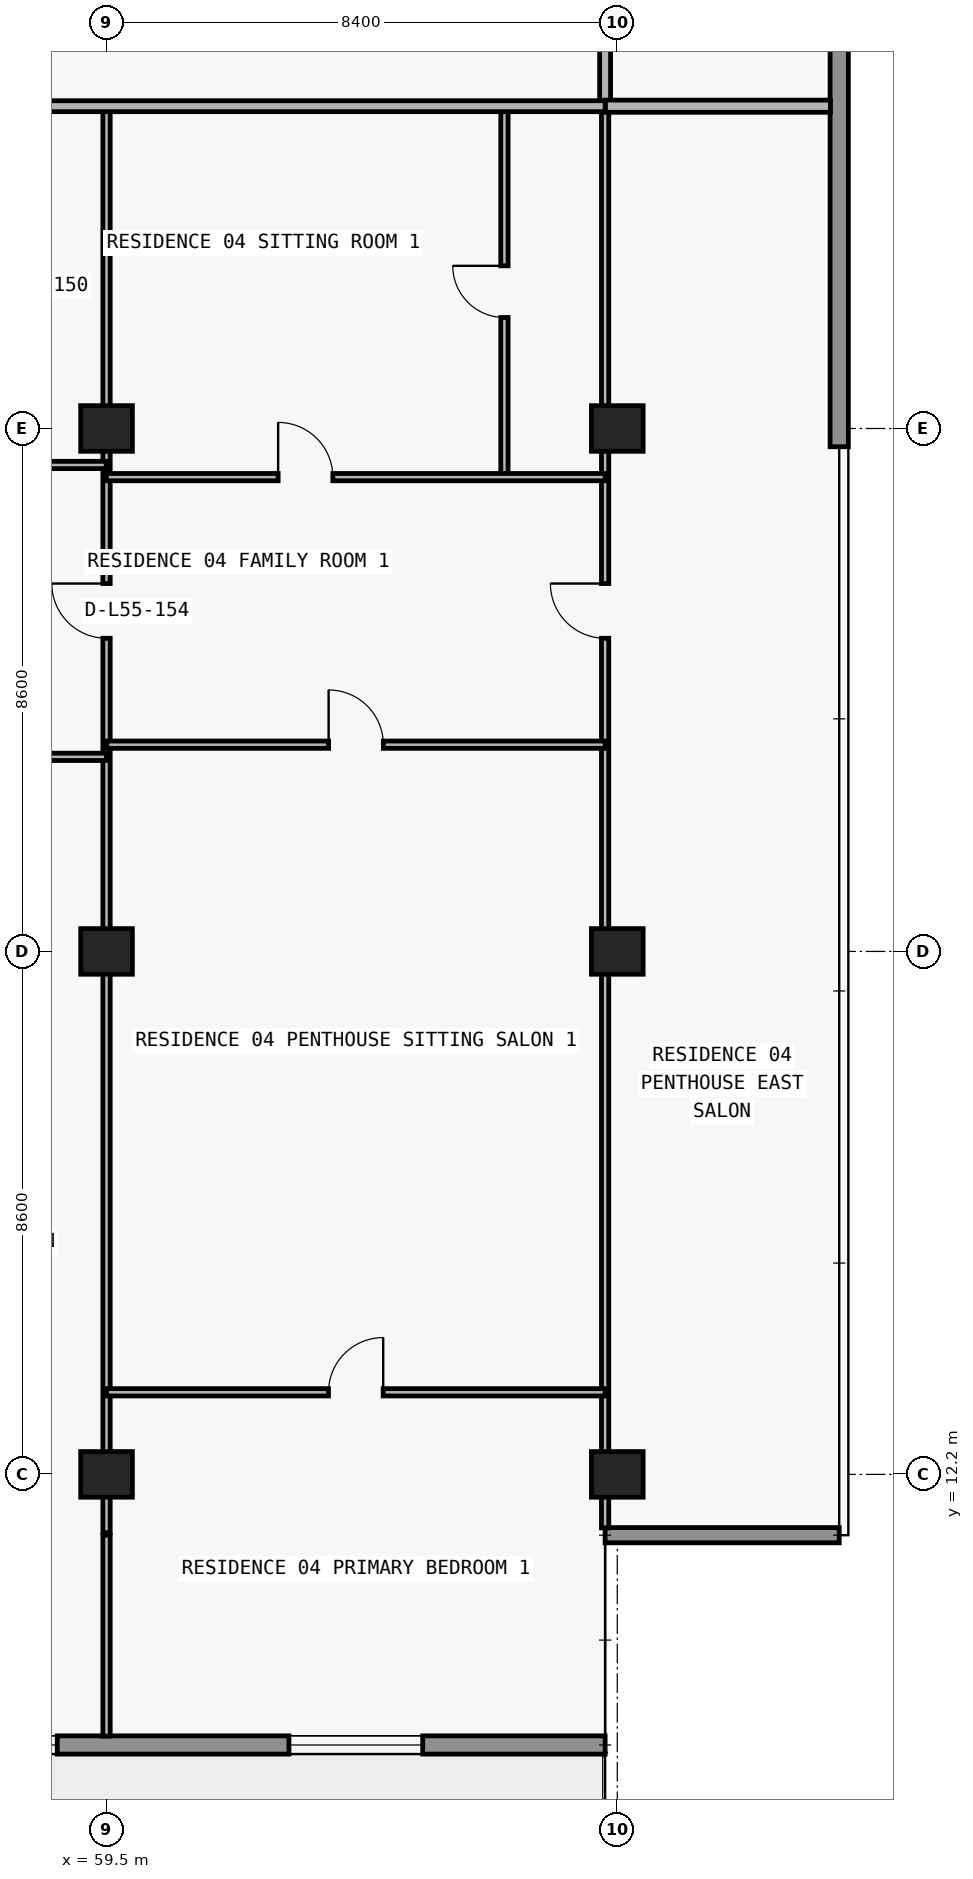
"""IFC4 building model, lengths in metres.
Left out: names, types, materials, properties, quantities, classifications, styles, units other than length and angle.
Written with IfcOpenShell. Run it as: python <this file> out.ifc"""

import sys

from ifc_helpers import new_model, si_unit, direction, frame, frame_2d, origin, origin_2d, place, context, subcontext, project, spatial, rectangle, extrude, element, fill, save


model = new_model("IFC4")
c1 = context("Model", 3, precision=1e-05, world=origin(), true_north=direction((0.0, 1.0)))
c2 = subcontext(c1, "Body", "Model", "MODEL_VIEW")
j1 = project(units=[si_unit("LENGTHUNIT", "METRE"), si_unit("PLANEANGLEUNIT", "RADIAN")], contexts=[c1])
p1 = place(None, origin())
s1 = spatial("IfcSite", under=j1, at=p1, CompositionType="ELEMENT")
p2 = place(p1, origin())
s2 = spatial("IfcBuilding", under=s1, at=p2, CompositionType="ELEMENT")
p3 = place(p2, frame((0.0, 0.0, 198.3)))
s3 = spatial("IfcBuildingStorey", under=s2, at=p3, CompositionType="ELEMENT", Elevation=198.3)
for number, where, z_axis, x_axis in (
    (1, (59.5, 12.2, 0.0), (0.0, 0.0, 1.0), (1.0, 0.0, 0.0)),
    (2, (67.9, 12.2, 0.0), (0.0, 0.0, 1.0), (1.0, 0.0, 0.0)),
    (3, (59.5, 20.8, 0.0), (0.0, 0.0, 1.0), (1.0, 0.0, 0.0)),
    (4, (67.9, 20.8, 0.0), (0.0, 0.0, 1.0), (1.0, 0.0, 0.0)),
    (5, (59.5, 29.4, 0.0), (0.0, 0.0, 1.0), (1.0, 0.0, 0.0)),
    (6, (67.9, 29.4, 0.0), (0.0, 0.0, 1.0), (1.0, 0.0, 0.0)),
):
    element("IfcColumn", number, at=place(p3, frame(where, z_axis=z_axis, x_axis=x_axis)), inside=s3, PredefinedType="COLUMN", context=c2, shape_type="SweptSolid", body=[
        extrude(rectangle(XDim=0.85, YDim=0.75, at=origin_2d()), origin(), (0.0, 0.0, 1.0), 3.05),
    ])
p4 = place(p3, frame((67.7, 7.75, 0.0), z_axis=(0.0, 0.0, 1.0), x_axis=(-1.0, 0.0, 0.0)))
e7 = element("IfcWall", 7, at=p4, inside=s3, PredefinedType="STANDARD", context=c2, shape_type="SweptSolid", body=[
    extrude(rectangle(XDim=57.6, YDim=0.3, at=frame_2d((28.8, 0.0))), origin(), (0.0, 0.0, 1.0), 3.05),
])
p5 = place(p4, frame((54.673, 0.0, 0.0)))
e8 = element("IfcOpeningElement", 8, at=p5, cuts=e7, PredefinedType="OPENING", context=c2, shape_type="SweptSolid", body=[
    extrude(rectangle(XDim=2.0, YDim=2.3, at=frame_2d((1.0, 1.15))), frame((0.0, 0.16, 0.0), z_axis=(0.0, -1.0, 0.0), x_axis=(1.0, 0.0, 0.0)), (0.0, 0.0, 1.0), 0.32),
])
p6 = place(p4, frame((50.473, 0.0, 0.85)))
e9 = element("IfcOpeningElement", 9, at=p6, cuts=e7, PredefinedType="OPENING", context=c2, shape_type="SweptSolid", body=[
    extrude(rectangle(XDim=2.2, YDim=1.55, at=frame_2d((1.1, 0.775))), frame((0.0, 0.16, 0.0), z_axis=(0.0, -1.0, 0.0), x_axis=(1.0, 0.0, 0.0)), (0.0, 0.0, 1.0), 0.32),
])
p7 = place(p4, frame((46.09, 0.0, 0.0)))
e10 = element("IfcOpeningElement", 10, at=p7, cuts=e7, PredefinedType="OPENING", context=c2, shape_type="SweptSolid", body=[
    extrude(rectangle(XDim=2.0, YDim=2.3, at=frame_2d((1.0, 1.15))), frame((0.0, 0.16, 0.0), z_axis=(0.0, -1.0, 0.0), x_axis=(1.0, 0.0, 0.0)), (0.0, 0.0, 1.0), 0.32),
])
p8 = place(p4, frame((41.99, 0.0, 0.85)))
e11 = element("IfcOpeningElement", 11, at=p8, cuts=e7, PredefinedType="OPENING", context=c2, shape_type="SweptSolid", body=[
    extrude(rectangle(XDim=1.8, YDim=1.55, at=frame_2d((0.9, 0.775))), frame((0.0, 0.16, 0.0), z_axis=(0.0, -1.0, 0.0), x_axis=(1.0, 0.0, 0.0)), (0.0, 0.0, 1.0), 0.32),
])
p9 = place(p4, frame((38.09, 0.0, 0.0)))
e12 = element("IfcOpeningElement", 12, at=p9, cuts=e7, PredefinedType="OPENING", context=c2, shape_type="SweptSolid", body=[
    extrude(rectangle(XDim=2.0, YDim=2.3, at=frame_2d((1.0, 1.15))), frame((0.0, 0.16, 0.0), z_axis=(0.0, -1.0, 0.0), x_axis=(1.0, 0.0, 0.0)), (0.0, 0.0, 1.0), 0.32),
])
p10 = place(p4, frame((33.41, 0.0, 0.65)))
e13 = element("IfcOpeningElement", 13, at=p10, cuts=e7, PredefinedType="OPENING", context=c2, shape_type="SweptSolid", body=[
    extrude(rectangle(XDim=2.6, YDim=1.85, at=frame_2d((1.3, 0.925))), frame((0.0, 0.16, 0.0), z_axis=(0.0, -1.0, 0.0), x_axis=(1.0, 0.0, 0.0)), (0.0, 0.0, 1.0), 0.32),
])
p11 = place(p4, frame((27.7, 0.0, 0.85)))
e14 = element("IfcOpeningElement", 14, at=p11, cuts=e7, PredefinedType="OPENING", context=c2, shape_type="SweptSolid", body=[
    extrude(rectangle(XDim=2.2, YDim=1.55, at=frame_2d((1.1, 0.775))), frame((0.0, 0.16, 0.0), z_axis=(0.0, -1.0, 0.0), x_axis=(1.0, 0.0, 0.0)), (0.0, 0.0, 1.0), 0.32),
])
p12 = place(p4, frame((19.7, 0.0, 0.85)))
e15 = element("IfcOpeningElement", 15, at=p12, cuts=e7, PredefinedType="OPENING", context=c2, shape_type="SweptSolid", body=[
    extrude(rectangle(XDim=2.2, YDim=1.55, at=frame_2d((1.1, 0.775))), frame((0.0, 0.16, 0.0), z_axis=(0.0, -1.0, 0.0), x_axis=(1.0, 0.0, 0.0)), (0.0, 0.0, 1.0), 0.32),
])
p13 = place(p4, frame((13.69, 0.0, 0.0)))
e16 = element("IfcOpeningElement", 16, at=p13, cuts=e7, PredefinedType="OPENING", context=c2, shape_type="SweptSolid", body=[
    extrude(rectangle(XDim=2.0, YDim=2.3, at=frame_2d((1.0, 1.15))), frame((0.0, 0.16, 0.0), z_axis=(0.0, -1.0, 0.0), x_axis=(1.0, 0.0, 0.0)), (0.0, 0.0, 1.0), 0.32),
])
p14 = place(p4, frame((9.01, 0.0, 0.65)))
e17 = element("IfcOpeningElement", 17, at=p14, cuts=e7, PredefinedType="OPENING", context=c2, shape_type="SweptSolid", body=[
    extrude(rectangle(XDim=2.6, YDim=1.85, at=frame_2d((1.3, 0.925))), frame((0.0, 0.16, 0.0), z_axis=(0.0, -1.0, 0.0), x_axis=(1.0, 0.0, 0.0)), (0.0, 0.0, 1.0), 0.32),
])
p15 = place(p4, frame((3.0, 0.0, 0.85)))
e18 = element("IfcOpeningElement", 18, at=p15, cuts=e7, PredefinedType="OPENING", context=c2, shape_type="SweptSolid", body=[
    extrude(rectangle(XDim=2.2, YDim=1.55, at=frame_2d((1.1, 0.775))), frame((0.0, 0.16, 0.0), z_axis=(0.0, -1.0, 0.0), x_axis=(1.0, 0.0, 0.0)), (0.0, 0.0, 1.0), 0.32),
])
p16 = place(p3, frame((67.7, 11.2, 0.0), z_axis=(0.0, 0.0, 1.0), x_axis=(1.0, 0.0, 0.0)))
e19 = element("IfcWall", 19, at=p16, inside=s3, PredefinedType="ELEMENTEDWALL", context=c2, shape_type="SweptSolid", body=[
    extrude(rectangle(XDim=3.85, YDim=0.25, at=frame_2d((1.925, 0.0))), origin(), (0.0, 0.0, 1.0), 3.05),
])
p17 = place(p3, frame((71.55, 47.0, 0.0), z_axis=(0.0, 0.0, 1.0), x_axis=(0.0, -1.0, 0.0)))
e20 = element("IfcWall", 20, at=p17, inside=s3, PredefinedType="STANDARD", context=c2, shape_type="SweptSolid", body=[
    extrude(rectangle(XDim=17.9, YDim=0.3, at=frame_2d((8.95, 0.0))), origin(), (0.0, 0.0, 1.0), 3.05),
])
p18 = place(p3, frame((59.5, 7.895, 0.0), z_axis=(0.0, 0.0, 1.0), x_axis=(0.0, 1.0, 0.0)))
e21 = element("IfcWall", 21, at=p18, inside=s3, PredefinedType="PARTITIONING", context=c2, shape_type="SweptSolid", body=[
    extrude(rectangle(XDim=3.305, YDim=0.12, at=frame_2d((1.652, 0.0))), origin(), (0.0, 0.0, 1.0), 3.05),
])
p19 = place(p3, frame((59.5, 11.24, 0.0), z_axis=(0.0, 0.0, 1.0), x_axis=(0.0, 1.0, 0.0)))
e22 = element("IfcWall", 22, at=p19, inside=s3, PredefinedType="PARTITIONING", context=c2, shape_type="SweptSolid", body=[
    extrude(rectangle(XDim=23.46, YDim=0.12, at=frame_2d((11.73, 0.0))), origin(), (0.0, 0.0, 1.0), 2.263),
])
p20 = place(p19, frame((14.71, 0.0, 0.0)))
e23 = element("IfcOpeningElement", 23, at=p20, cuts=e22, PredefinedType="OPENING", context=c2, shape_type="SweptSolid", body=[
    extrude(rectangle(XDim=0.9, YDim=2.15, at=frame_2d((0.45, 1.075))), frame((0.0, 0.07, 0.0), z_axis=(0.0, -1.0, 0.0), x_axis=(1.0, 0.0, 0.0)), (0.0, 0.0, 1.0), 0.14),
])
p21 = place(p3, frame((66.044, 28.6, 0.0), z_axis=(0.0, 0.0, 1.0), x_axis=(0.0, 1.0, 0.0)))
e24 = element("IfcWall", 24, at=p21, inside=s3, PredefinedType="PARTITIONING", context=c2, shape_type="SweptSolid", body=[
    extrude(rectangle(XDim=6.1, YDim=0.12, at=frame_2d((3.05, 0.0))), origin(), (0.0, 0.0, 1.0), 3.05),
])
p22 = place(p21, frame((2.625, 0.0, 0.0)))
e25 = element("IfcOpeningElement", 25, at=p22, cuts=e24, PredefinedType="OPENING", context=c2, shape_type="SweptSolid", body=[
    extrude(rectangle(XDim=0.85, YDim=2.1, at=frame_2d((0.425, 1.05))), frame((0.0, 0.07, 0.0), z_axis=(0.0, -1.0, 0.0), x_axis=(1.0, 0.0, 0.0)), (0.0, 0.0, 1.0), 0.14),
])
p23 = place(p3, frame((67.7, 11.32, 0.0), z_axis=(0.0, 0.0, 1.0), x_axis=(0.0, 1.0, 0.0)))
e26 = element("IfcWall", 26, at=p23, inside=s3, PredefinedType="PARTITIONING", context=c2, shape_type="SweptSolid", body=[
    extrude(rectangle(XDim=23.38, YDim=0.12, at=frame_2d((11.69, 0.0))), origin(), (0.0, 0.0, 1.0), 2.263),
])
p24 = place(p23, frame((14.63, 0.0, 0.0)))
e27 = element("IfcOpeningElement", 27, at=p24, cuts=e26, PredefinedType="OPENING", context=c2, shape_type="SweptSolid", body=[
    extrude(rectangle(XDim=0.9, YDim=2.15, at=frame_2d((0.45, 1.075))), frame((0.0, 0.07, 0.0), z_axis=(0.0, -1.0, 0.0), x_axis=(1.0, 0.0, 0.0)), (0.0, 0.0, 1.0), 0.14),
])
p25 = place(p3, frame((67.7, 34.705, 0.0), z_axis=(0.0, 0.0, 1.0), x_axis=(0.0, 1.0, 0.0)))
e28 = element("IfcWall", 28, at=p25, inside=s3, PredefinedType="PARTITIONING", context=c2, shape_type="SweptSolid", body=[
    extrude(rectangle(XDim=2.295, YDim=0.18, at=frame_2d((1.147, 0.0))), origin(), (0.0, 0.0, 1.0), 2.263),
])
p26 = place(p3, frame((59.5, 13.55, 0.0), z_axis=(0.0, 0.0, 1.0), x_axis=(1.0, 0.0, 0.0)))
e29 = element("IfcWall", 29, at=p26, inside=s3, PredefinedType="PARTITIONING", context=c2, shape_type="SweptSolid", body=[
    extrude(rectangle(XDim=8.2, YDim=0.12, at=frame_2d((4.1, 0.0))), origin(), (0.0, 0.0, 1.0), 3.05),
])
p27 = place(p26, frame((3.65, 0.0, 0.0)))
e30 = element("IfcOpeningElement", 30, at=p27, cuts=e29, PredefinedType="OPENING", context=c2, shape_type="SweptSolid", body=[
    extrude(rectangle(XDim=0.9, YDim=2.15, at=frame_2d((0.45, 1.075))), frame((0.0, 0.07, 0.0), z_axis=(0.0, -1.0, 0.0), x_axis=(1.0, 0.0, 0.0)), (0.0, 0.0, 1.0), 0.14),
])
p28 = place(p3, frame((51.32, 24.0, 0.0), z_axis=(0.0, 0.0, 1.0), x_axis=(1.0, 0.0, 0.0)))
e31 = element("IfcWall", 31, at=p28, inside=s3, PredefinedType="PARTITIONING", context=c2, shape_type="SweptSolid", body=[
    extrude(rectangle(XDim=8.18, YDim=0.12, at=frame_2d((4.09, 0.0))), origin(), (0.0, 0.0, 1.0), 3.05),
])
p29 = place(p28, frame((1.204, 0.0, 0.0)))
e32 = element("IfcOpeningElement", 32, at=p29, cuts=e31, PredefinedType="OPENING", context=c2, shape_type="SweptSolid", body=[
    extrude(rectangle(XDim=0.9, YDim=2.15, at=frame_2d((0.45, 1.075))), frame((0.0, 0.07, 0.0), z_axis=(0.0, -1.0, 0.0), x_axis=(1.0, 0.0, 0.0)), (0.0, 0.0, 1.0), 0.14),
])
p30 = place(p3, frame((59.505, 24.2, 0.0), z_axis=(0.0, 0.0, 1.0), x_axis=(1.0, 0.0, 0.0)))
e33 = element("IfcWall", 33, at=p30, inside=s3, PredefinedType="PARTITIONING", context=c2, shape_type="SweptSolid", body=[
    extrude(rectangle(XDim=8.195, YDim=0.12, at=frame_2d((4.098, 0.0))), origin(), (0.0, 0.0, 1.0), 3.05),
])
p31 = place(p30, frame((3.647, 0.0, 0.0)))
e34 = element("IfcOpeningElement", 34, at=p31, cuts=e33, PredefinedType="OPENING", context=c2, shape_type="SweptSolid", body=[
    extrude(rectangle(XDim=0.9, YDim=2.15, at=frame_2d((0.45, 1.075))), frame((0.0, 0.07, 0.0), z_axis=(0.0, -1.0, 0.0), x_axis=(1.0, 0.0, 0.0)), (0.0, 0.0, 1.0), 0.14),
])
p32 = place(p3, frame((59.5, 28.6, 0.0), z_axis=(0.0, 0.0, 1.0), x_axis=(1.0, 0.0, 0.0)))
e35 = element("IfcWall", 35, at=p32, inside=s3, PredefinedType="PARTITIONING", context=c2, shape_type="SweptSolid", body=[
    extrude(rectangle(XDim=8.2, YDim=0.12, at=frame_2d((4.1, 0.0))), origin(), (0.0, 0.0, 1.0), 3.05),
])
p33 = place(p32, frame((2.822, 0.0, 0.0)))
e36 = element("IfcOpeningElement", 36, at=p33, cuts=e35, PredefinedType="OPENING", context=c2, shape_type="SweptSolid", body=[
    extrude(rectangle(XDim=0.9, YDim=2.15, at=frame_2d((0.45, 1.075))), frame((0.0, 0.07, 0.0), z_axis=(0.0, -1.0, 0.0), x_axis=(1.0, 0.0, 0.0)), (0.0, 0.0, 1.0), 0.14),
])
p34 = place(p3, frame((51.32, 28.8, 0.0), z_axis=(0.0, 0.0, 1.0), x_axis=(1.0, 0.0, 0.0)))
e37 = element("IfcWall", 37, at=p34, inside=s3, PredefinedType="PARTITIONING", context=c2, shape_type="SweptSolid", body=[
    extrude(rectangle(XDim=8.175, YDim=0.12, at=frame_2d((4.087, 0.0))), origin(), (0.0, 0.0, 1.0), 3.05),
])
p35 = place(p34, frame((1.204, 0.0, 0.0)))
e38 = element("IfcOpeningElement", 38, at=p35, cuts=e37, PredefinedType="OPENING", context=c2, shape_type="SweptSolid", body=[
    extrude(rectangle(XDim=0.9, YDim=2.15, at=frame_2d((0.45, 1.075))), frame((0.0, 0.07, 0.0), z_axis=(0.0, -1.0, 0.0), x_axis=(1.0, 0.0, 0.0)), (0.0, 0.0, 1.0), 0.14),
])
p36 = place(p3, frame((10.105, 34.7, 0.0), z_axis=(0.0, 0.0, 1.0), x_axis=(1.0, 0.0, 0.0)))
e39 = element("IfcWall", 39, at=p36, inside=s3, PredefinedType="PARTITIONING", context=c2, shape_type="SweptSolid", body=[
    extrude(rectangle(XDim=57.595, YDim=0.18, at=frame_2d((28.797, 0.0))), origin(), (0.0, 0.0, 1.0), 3.05),
])
p37 = place(p36, frame((2.365, 0.0, 0.0)))
e40 = element("IfcOpeningElement", 40, at=p37, cuts=e39, PredefinedType="OPENING", context=c2, shape_type="SweptSolid", body=[
    extrude(rectangle(XDim=1.0, YDim=2.2, at=frame_2d((0.5, 1.1))), frame((0.0, 0.1, 0.0), z_axis=(0.0, -1.0, 0.0), x_axis=(1.0, 0.0, 0.0)), (0.0, 0.0, 1.0), 0.2),
])
p38 = place(p36, frame((10.833, 0.0, 0.0)))
e41 = element("IfcOpeningElement", 41, at=p38, cuts=e39, PredefinedType="OPENING", context=c2, shape_type="SweptSolid", body=[
    extrude(rectangle(XDim=1.0, YDim=2.2, at=frame_2d((0.5, 1.1))), frame((0.0, 0.1, 0.0), z_axis=(0.0, -1.0, 0.0), x_axis=(1.0, 0.0, 0.0)), (0.0, 0.0, 1.0), 0.2),
])
p39 = place(p36, frame((19.422, 0.0, 0.0)))
e42 = element("IfcOpeningElement", 42, at=p39, cuts=e39, PredefinedType="OPENING", context=c2, shape_type="SweptSolid", body=[
    extrude(rectangle(XDim=1.0, YDim=2.2, at=frame_2d((0.5, 1.1))), frame((0.0, 0.1, 0.0), z_axis=(0.0, -1.0, 0.0), x_axis=(1.0, 0.0, 0.0)), (0.0, 0.0, 1.0), 0.2),
])
p40 = place(p36, frame((43.865, 0.0, 0.0)))
e43 = element("IfcOpeningElement", 43, at=p40, cuts=e39, PredefinedType="OPENING", context=c2, shape_type="SweptSolid", body=[
    extrude(rectangle(XDim=1.0, YDim=2.2, at=frame_2d((0.5, 1.1))), frame((0.0, 0.1, 0.0), z_axis=(0.0, -1.0, 0.0), x_axis=(1.0, 0.0, 0.0)), (0.0, 0.0, 1.0), 0.2),
])
p41 = place(p3, frame((67.705, 34.7, 0.0), z_axis=(0.0, 0.0, 1.0), x_axis=(1.0, 0.0, 0.0)))
e44 = element("IfcWall", 44, at=p41, inside=s3, PredefinedType="PARTITIONING", context=c2, shape_type="SweptSolid", body=[
    extrude(rectangle(XDim=3.7, YDim=0.2, at=frame_2d((1.85, 0.0))), origin(), (0.0, 0.0, 1.0), 3.05),
])
p42 = place(p14, origin())
e45 = element("IfcWindow", 45, at=p42, inside=s3, PartitioningType="SINGLE_PANEL", PredefinedType="WINDOW", context=c2, shape_type="SweptSolid", body=[
    extrude(rectangle(XDim=2.6, YDim=1.85, at=frame_2d((1.3, 0.925))), frame((0.0, 0.03, 0.0), z_axis=(0.0, -1.0, 0.0), x_axis=(1.0, 0.0, 0.0)), (0.0, 0.0, 1.0), 0.06),
])
fill(e17, e45)
p43 = place(p15, origin())
e46 = element("IfcWindow", 46, at=p43, inside=s3, PartitioningType="SINGLE_PANEL", PredefinedType="WINDOW", context=c2, shape_type="SweptSolid", body=[
    extrude(rectangle(XDim=2.2, YDim=1.55, at=frame_2d((1.1, 0.775))), frame((0.0, 0.03, 0.0), z_axis=(0.0, -1.0, 0.0), x_axis=(1.0, 0.0, 0.0)), (0.0, 0.0, 1.0), 0.06),
])
fill(e18, e46)
p44 = place(p20, origin())
e47 = element("IfcDoor", 47, at=p44, inside=s3, OperationType="SINGLE_SWING_RIGHT", PredefinedType="DOOR", context=c2, shape_type="SweptSolid", body=[
    extrude(rectangle(XDim=0.9, YDim=2.15, at=frame_2d((0.45, 1.075))), frame((0.0, 0.025, 0.0), z_axis=(0.0, -1.0, 0.0), x_axis=(1.0, 0.0, 0.0)), (0.0, 0.0, 1.0), 0.05),
])
fill(e23, e47)
p45 = place(p33, origin())
e48 = element("IfcDoor", 48, at=p45, inside=s3, OperationType="SINGLE_SWING_LEFT", PredefinedType="DOOR", context=c2, shape_type="SweptSolid", body=[
    extrude(rectangle(XDim=0.9, YDim=2.15, at=frame_2d((0.45, 1.075))), frame((0.0, 0.025, 0.0), z_axis=(0.0, -1.0, 0.0), x_axis=(1.0, 0.0, 0.0)), (0.0, 0.0, 1.0), 0.05),
])
fill(e36, e48)
p46 = place(p22, origin())
e49 = element("IfcDoor", 49, at=p46, inside=s3, OperationType="SINGLE_SWING_RIGHT", PredefinedType="DOOR", context=c2, shape_type="SweptSolid", body=[
    extrude(rectangle(XDim=0.85, YDim=2.1, at=frame_2d((0.425, 1.05))), frame((0.0, 0.025, 0.0), z_axis=(0.0, -1.0, 0.0), x_axis=(1.0, 0.0, 0.0)), (0.0, 0.0, 1.0), 0.05),
])
fill(e25, e49)
p47 = place(p31, origin())
e50 = element("IfcDoor", 50, at=p47, inside=s3, OperationType="SINGLE_SWING_LEFT", PredefinedType="DOOR", context=c2, shape_type="SweptSolid", body=[
    extrude(rectangle(XDim=0.9, YDim=2.15, at=frame_2d((0.45, 1.075))), frame((0.0, 0.025, 0.0), z_axis=(0.0, -1.0, 0.0), x_axis=(1.0, 0.0, 0.0)), (0.0, 0.0, 1.0), 0.05),
])
fill(e34, e50)
p48 = place(p27, origin())
e51 = element("IfcDoor", 51, at=p48, inside=s3, OperationType="SINGLE_SWING_RIGHT", PredefinedType="DOOR", context=c2, shape_type="SweptSolid", body=[
    extrude(rectangle(XDim=0.9, YDim=2.15, at=frame_2d((0.45, 1.075))), frame((0.0, 0.025, 0.0), z_axis=(0.0, -1.0, 0.0), x_axis=(1.0, 0.0, 0.0)), (0.0, 0.0, 1.0), 0.05),
])
fill(e30, e51)
p49 = place(p24, origin())
e52 = element("IfcDoor", 52, at=p49, inside=s3, OperationType="SINGLE_SWING_RIGHT", PredefinedType="DOOR", context=c2, shape_type="SweptSolid", body=[
    extrude(rectangle(XDim=0.9, YDim=2.15, at=frame_2d((0.45, 1.075))), frame((0.0, 0.025, 0.0), z_axis=(0.0, -1.0, 0.0), x_axis=(1.0, 0.0, 0.0)), (0.0, 0.0, 1.0), 0.05),
])
fill(e27, e52)
save(model, sys.argv[1])
